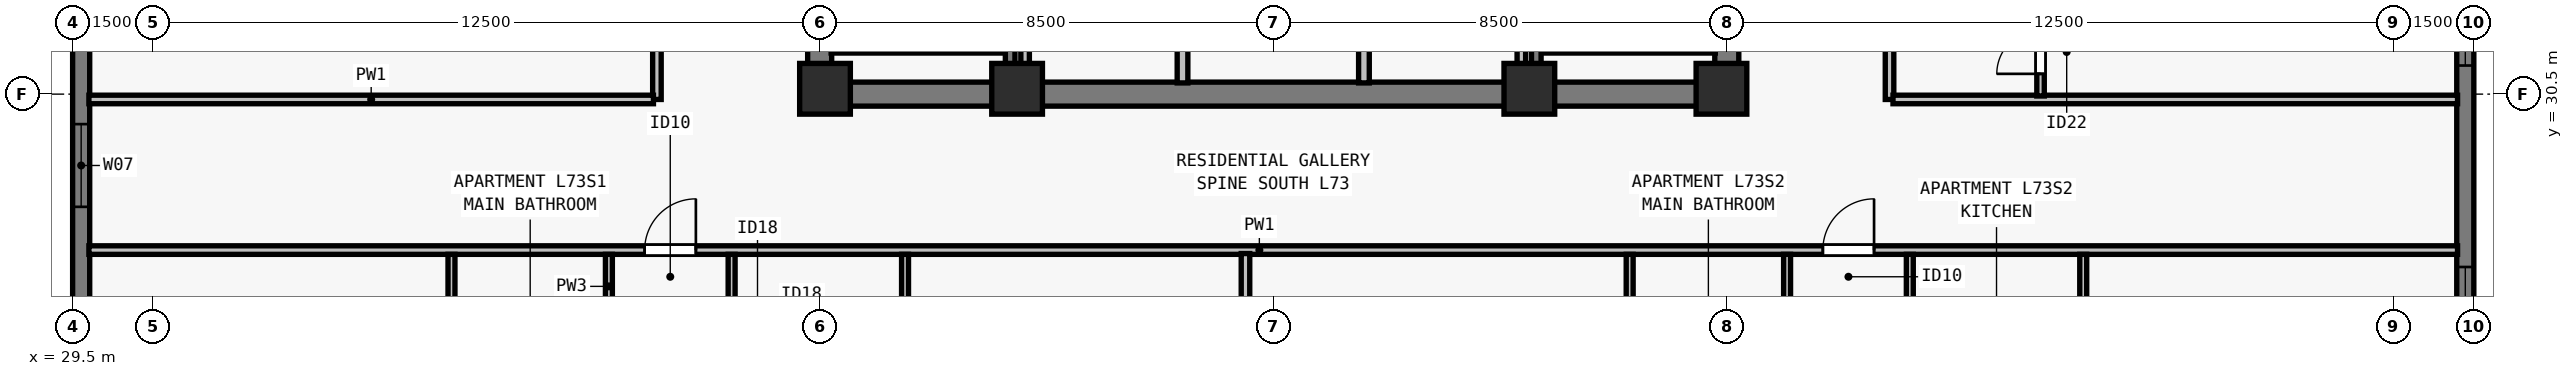
"""IFC4 building model, lengths in metres.
Left out: names, types, materials, properties, quantities, classifications, styles, units other than length and angle.
Written with IfcOpenShell. Run it as: python <this file> out.ifc"""

import sys

from ifc_helpers import new_model, si_unit, direction, frame, frame_2d, origin, origin_2d, place, context, subcontext, project, spatial, rectangle, extrude, element, fill, save


model = new_model("IFC4")
c1 = context("Model", 3, precision=1e-05, world=origin(), true_north=direction((0.0, 1.0)))
c2 = subcontext(c1, "Body", "Model", "MODEL_VIEW")
j1 = project(units=[si_unit("LENGTHUNIT", "METRE"), si_unit("PLANEANGLEUNIT", "RADIAN")], contexts=[c1])
p1 = place(None, origin())
s1 = spatial("IfcSite", under=j1, at=p1, CompositionType="ELEMENT")
p2 = place(p1, origin())
s2 = spatial("IfcBuilding", under=s1, at=p2, CompositionType="ELEMENT")
p3 = place(p2, frame((0.0, 0.0, 265.5)))
s3 = spatial("IfcBuildingStorey", under=s2, at=p3, CompositionType="ELEMENT", Elevation=265.5)
for number, where, z_axis, x_axis in (
    (1, (43.6, 30.6, 0.0), (0.0, 0.0, 1.0), (1.0, 0.0, 0.0)),
    (2, (47.2, 30.6, 0.0), (0.0, 0.0, 1.0), (1.0, 0.0, 0.0)),
    (3, (56.8, 30.6, 0.0), (0.0, 0.0, 1.0), (1.0, 0.0, 0.0)),
    (4, (60.4, 30.6, 0.0), (0.0, 0.0, 1.0), (1.0, 0.0, 0.0)),
):
    element("IfcColumn", number, at=place(p3, frame(where, z_axis=z_axis, x_axis=x_axis)), inside=s3, PredefinedType="COLUMN", context=c2, shape_type="SweptSolid", body=[
        extrude(rectangle(XDim=0.95, YDim=0.95, at=origin_2d()), origin(), (0.0, 0.0, 1.0), 3.5),
    ])
p4 = place(p3, frame((29.66, 21.5, 0.0), z_axis=(0.0, 0.0, 1.0), x_axis=(0.0, 1.0, 0.0)))
e5 = element("IfcWall", 5, at=p4, inside=s3, PredefinedType="SOLIDWALL", context=c2, shape_type="SweptSolid", body=[
    extrude(rectangle(XDim=34.702, YDim=0.32, at=frame_2d((17.351, 0.0))), origin(), (0.0, 0.0, 1.0), 3.29),
])
p5 = place(p4, frame((6.888, 0.0, 0.8)))
e6 = element("IfcOpeningElement", 6, at=p5, cuts=e5, PredefinedType="OPENING", context=c2, shape_type="SweptSolid", body=[
    extrude(rectangle(XDim=1.55, YDim=1.678, at=frame_2d((0.775, 0.839))), frame((0.0, 0.17, 0.0), z_axis=(0.0, -1.0, 0.0), x_axis=(1.0, 0.0, 0.0)), (0.0, 0.0, 1.0), 0.34),
])
p6 = place(p4, frame((10.113, 0.0, 0.8)))
e7 = element("IfcOpeningElement", 7, at=p6, cuts=e5, PredefinedType="OPENING", context=c2, shape_type="SweptSolid", body=[
    extrude(rectangle(XDim=1.85, YDim=1.678, at=frame_2d((0.925, 0.839))), frame((0.0, 0.17, 0.0), z_axis=(0.0, -1.0, 0.0), x_axis=(1.0, 0.0, 0.0)), (0.0, 0.0, 1.0), 0.34),
])
p7 = place(p4, frame((14.888, 0.0, 0.8)))
e8 = element("IfcOpeningElement", 8, at=p7, cuts=e5, PredefinedType="OPENING", context=c2, shape_type="SweptSolid", body=[
    extrude(rectangle(XDim=1.55, YDim=1.678, at=frame_2d((0.775, 0.839))), frame((0.0, 0.17, 0.0), z_axis=(0.0, -1.0, 0.0), x_axis=(1.0, 0.0, 0.0)), (0.0, 0.0, 1.0), 0.34),
])
p8 = place(p4, frame((18.114, 0.0, 0.8)))
e9 = element("IfcOpeningElement", 9, at=p8, cuts=e5, PredefinedType="OPENING", context=c2, shape_type="SweptSolid", body=[
    extrude(rectangle(XDim=1.85, YDim=1.678, at=frame_2d((0.925, 0.839))), frame((0.0, 0.17, 0.0), z_axis=(0.0, -1.0, 0.0), x_axis=(1.0, 0.0, 0.0)), (0.0, 0.0, 1.0), 0.34),
])
p9 = place(p4, frame((23.614, 0.0, 0.8)))
e10 = element("IfcOpeningElement", 10, at=p9, cuts=e5, PredefinedType="OPENING", context=c2, shape_type="SweptSolid", body=[
    extrude(rectangle(XDim=1.85, YDim=1.678, at=frame_2d((0.925, 0.839))), frame((0.0, 0.17, 0.0), z_axis=(0.0, -1.0, 0.0), x_axis=(1.0, 0.0, 0.0)), (0.0, 0.0, 1.0), 0.34),
])
p10 = place(p4, frame((29.24, 0.0, 0.8)))
e11 = element("IfcOpeningElement", 11, at=p10, cuts=e5, PredefinedType="OPENING", context=c2, shape_type="SweptSolid", body=[
    extrude(rectangle(XDim=1.55, YDim=1.678, at=frame_2d((0.775, 0.839))), frame((0.0, 0.17, 0.0), z_axis=(0.0, -1.0, 0.0), x_axis=(1.0, 0.0, 0.0)), (0.0, 0.0, 1.0), 0.34),
])
p11 = place(p3, frame((74.34, 56.5, 0.0), z_axis=(0.0, 0.0, 1.0), x_axis=(0.0, -1.0, 0.0)))
e12 = element("IfcWall", 12, at=p11, inside=s3, PredefinedType="SOLIDWALL", context=c2, shape_type="SweptSolid", body=[
    extrude(rectangle(XDim=34.702, YDim=0.32, at=frame_2d((17.351, 0.0))), origin(), (0.0, 0.0, 1.0), 3.29),
])
p12 = place(p11, frame((6.888, 0.0, 0.8)))
e13 = element("IfcOpeningElement", 13, at=p12, cuts=e12, PredefinedType="OPENING", context=c2, shape_type="SweptSolid", body=[
    extrude(rectangle(XDim=1.55, YDim=1.678, at=frame_2d((0.775, 0.839))), frame((0.0, 0.17, 0.0), z_axis=(0.0, -1.0, 0.0), x_axis=(1.0, 0.0, 0.0)), (0.0, 0.0, 1.0), 0.34),
])
p13 = place(p11, frame((10.113, 0.0, 0.8)))
e14 = element("IfcOpeningElement", 14, at=p13, cuts=e12, PredefinedType="OPENING", context=c2, shape_type="SweptSolid", body=[
    extrude(rectangle(XDim=1.85, YDim=1.678, at=frame_2d((0.925, 0.839))), frame((0.0, 0.17, 0.0), z_axis=(0.0, -1.0, 0.0), x_axis=(1.0, 0.0, 0.0)), (0.0, 0.0, 1.0), 0.34),
])
p14 = place(p11, frame((14.038, 0.0, 0.8)))
e15 = element("IfcOpeningElement", 15, at=p14, cuts=e12, PredefinedType="OPENING", context=c2, shape_type="SweptSolid", body=[
    extrude(rectangle(XDim=1.55, YDim=1.678, at=frame_2d((0.775, 0.839))), frame((0.0, 0.17, 0.0), z_axis=(0.0, -1.0, 0.0), x_axis=(1.0, 0.0, 0.0)), (0.0, 0.0, 1.0), 0.34),
])
p15 = place(p11, frame((18.114, 0.0, 0.8)))
e16 = element("IfcOpeningElement", 16, at=p15, cuts=e12, PredefinedType="OPENING", context=c2, shape_type="SweptSolid", body=[
    extrude(rectangle(XDim=1.85, YDim=1.678, at=frame_2d((0.925, 0.839))), frame((0.0, 0.17, 0.0), z_axis=(0.0, -1.0, 0.0), x_axis=(1.0, 0.0, 0.0)), (0.0, 0.0, 1.0), 0.34),
])
p16 = place(p11, frame((23.614, 0.0, 0.8)))
e17 = element("IfcOpeningElement", 17, at=p16, cuts=e12, PredefinedType="OPENING", context=c2, shape_type="SweptSolid", body=[
    extrude(rectangle(XDim=1.85, YDim=1.678, at=frame_2d((0.925, 0.839))), frame((0.0, 0.17, 0.0), z_axis=(0.0, -1.0, 0.0), x_axis=(1.0, 0.0, 0.0)), (0.0, 0.0, 1.0), 0.34),
])
p17 = place(p11, frame((29.24, 0.0, 0.8)))
e18 = element("IfcOpeningElement", 18, at=p17, cuts=e12, PredefinedType="OPENING", context=c2, shape_type="SweptSolid", body=[
    extrude(rectangle(XDim=1.55, YDim=1.678, at=frame_2d((0.775, 0.839))), frame((0.0, 0.17, 0.0), z_axis=(0.0, -1.0, 0.0), x_axis=(1.0, 0.0, 0.0)), (0.0, 0.0, 1.0), 0.34),
])
p18 = place(p3, frame((43.275, 30.5, 0.0), z_axis=(0.0, 0.0, 1.0), x_axis=(1.0, 0.0, 0.0)))
e19 = element("IfcWall", 19, at=p18, inside=s3, PredefinedType="SHEAR", context=c2, shape_type="SweptSolid", body=[
    extrude(rectangle(XDim=17.45, YDim=0.45, at=frame_2d((8.725, 0.0))), origin(), (0.0, 0.0, 1.0), 3.29),
])
for number, where, z_axis, x_axis in (
    (20, (43.5, 30.715, 0.0), (0.0, 0.0, 1.0), (0.0, 1.0, 0.0)),
    (21, (60.5, 30.715, 0.0), (0.0, 0.0, 1.0), (0.0, 1.0, 0.0)),
):
    element("IfcWall", number, at=place(p3, frame(where, z_axis=z_axis, x_axis=x_axis)), inside=s3, PredefinedType="SHEAR", context=c2, shape_type="SweptSolid", body=[
        extrude(rectangle(XDim=8.035, YDim=0.45, at=frame_2d((4.018, 0.0))), origin(), (0.0, 0.0, 1.0), 3.29),
    ])
p19 = place(p3, frame((50.3, 30.71, 0.0), z_axis=(0.0, 0.0, 1.0), x_axis=(0.0, 1.0, 0.0)))
e22 = element("IfcWall", 22, at=p19, inside=s3, PredefinedType="SOLIDWALL", context=c2, shape_type="SweptSolid", body=[
    extrude(rectangle(XDim=7.905, YDim=0.2, at=frame_2d((3.953, 0.0))), origin(), (0.0, 0.0, 1.0), 3.29),
])
p20 = place(p19, frame((3.34, 0.0, 0.0)))
e23 = element("IfcOpeningElement", 23, at=p20, cuts=e22, PredefinedType="OPENING", context=c2, shape_type="SweptSolid", body=[
    extrude(rectangle(XDim=0.9, YDim=2.12, at=frame_2d((0.45, 1.06))), frame((0.0, 0.11, 0.0), z_axis=(0.0, -1.0, 0.0), x_axis=(1.0, 0.0, 0.0)), (0.0, 0.0, 1.0), 0.22),
])
p21 = place(p3, frame((53.7, 30.71, 0.0), z_axis=(0.0, 0.0, 1.0), x_axis=(0.0, 1.0, 0.0)))
e24 = element("IfcWall", 24, at=p21, inside=s3, PredefinedType="SOLIDWALL", context=c2, shape_type="SweptSolid", body=[
    extrude(rectangle(XDim=7.905, YDim=0.2, at=frame_2d((3.953, 0.0))), origin(), (0.0, 0.0, 1.0), 3.29),
])
p22 = place(p21, frame((3.14, 0.0, 0.0)))
e25 = element("IfcOpeningElement", 25, at=p22, cuts=e24, PredefinedType="OPENING", context=c2, shape_type="SweptSolid", body=[
    extrude(rectangle(XDim=0.9, YDim=2.12, at=frame_2d((0.45, 1.06))), frame((0.0, 0.11, 0.0), z_axis=(0.0, -1.0, 0.0), x_axis=(1.0, 0.0, 0.0)), (0.0, 0.0, 1.0), 0.22),
])
for number, where, z_axis, x_axis in (
    (26, (47.35, 30.71, 0.0), (0.0, 0.0, 1.0), (0.0, 1.0, 0.0)),
    (27, (56.65, 30.71, 0.0), (0.0, 0.0, 1.0), (0.0, 1.0, 0.0)),
):
    element("IfcWall", number, at=place(p3, frame(where, z_axis=z_axis, x_axis=x_axis)), inside=s3, PredefinedType="PARTITIONING", context=c2, shape_type="SweptSolid", body=[
        extrude(rectangle(XDim=7.905, YDim=0.16, at=frame_2d((3.953, 0.0))), origin(), (0.0, 0.0, 1.0), 3.29),
    ])
p23 = place(p3, frame((29.805, 27.577, 0.0), z_axis=(0.0, 0.0, 1.0), x_axis=(1.0, 0.0, 0.0)))
e28 = element("IfcWall", 28, at=p23, inside=s3, PredefinedType="PARTITIONING", context=c2, shape_type="SweptSolid", body=[
    extrude(rectangle(XDim=44.39, YDim=0.16, at=frame_2d((22.195, 0.0))), origin(), (0.0, 0.0, 1.0), 2.958),
])
p24 = place(p23, frame((10.415, 0.0, 0.0)))
e29 = element("IfcOpeningElement", 29, at=p24, cuts=e28, PredefinedType="OPENING", context=c2, shape_type="SweptSolid", body=[
    extrude(rectangle(XDim=0.96, YDim=2.18, at=frame_2d((0.48, 1.09))), frame((0.0, 0.09, 0.0), z_axis=(0.0, -1.0, 0.0), x_axis=(1.0, 0.0, 0.0)), (0.0, 0.0, 1.0), 0.18),
])
p25 = place(p23, frame((32.495, 0.0, 0.0)))
e30 = element("IfcOpeningElement", 30, at=p25, cuts=e28, PredefinedType="OPENING", context=c2, shape_type="SweptSolid", body=[
    extrude(rectangle(XDim=0.96, YDim=2.18, at=frame_2d((0.48, 1.09))), frame((0.0, 0.09, 0.0), z_axis=(0.0, -1.0, 0.0), x_axis=(1.0, 0.0, 0.0)), (0.0, 0.0, 1.0), 0.18),
])
p26 = place(p3, frame((40.45, 30.4, 0.0), z_axis=(0.0, 0.0, 1.0), x_axis=(0.0, 1.0, 0.0)))
e31 = element("IfcWall", 31, at=p26, inside=s3, PredefinedType="PARTITIONING", context=c2, shape_type="SweptSolid", body=[
    extrude(rectangle(XDim=17.2, YDim=0.16, at=frame_2d((8.6, 0.0))), origin(), (0.0, 0.0, 1.0), 3.29),
])
p27 = place(p26, frame((3.6, 0.0, 0.0)))
e32 = element("IfcOpeningElement", 32, at=p27, cuts=e31, PredefinedType="OPENING", context=c2, shape_type="SweptSolid", body=[
    extrude(rectangle(XDim=0.96, YDim=2.12, at=frame_2d((0.48, 1.06))), frame((0.0, 0.09, 0.0), z_axis=(0.0, -1.0, 0.0), x_axis=(1.0, 0.0, 0.0)), (0.0, 0.0, 1.0), 0.18),
])
p28 = place(p26, frame((12.44, 0.0, 0.0)))
e33 = element("IfcOpeningElement", 33, at=p28, cuts=e31, PredefinedType="OPENING", context=c2, shape_type="SweptSolid", body=[
    extrude(rectangle(XDim=0.96, YDim=2.18, at=frame_2d((0.48, 1.09))), frame((0.0, 0.09, 0.0), z_axis=(0.0, -1.0, 0.0), x_axis=(1.0, 0.0, 0.0)), (0.0, 0.0, 1.0), 0.18),
])
p29 = place(p3, frame((63.55, 30.4, 0.0), z_axis=(0.0, 0.0, 1.0), x_axis=(0.0, 1.0, 0.0)))
e34 = element("IfcWall", 34, at=p29, inside=s3, PredefinedType="PARTITIONING", context=c2, shape_type="SweptSolid", body=[
    extrude(rectangle(XDim=17.2, YDim=0.16, at=frame_2d((8.6, 0.0))), origin(), (0.0, 0.0, 1.0), 3.29),
])
p30 = place(p29, frame((8.12, 0.0, 0.0)))
e35 = element("IfcOpeningElement", 35, at=p30, cuts=e34, PredefinedType="OPENING", context=c2, shape_type="SweptSolid", body=[
    extrude(rectangle(XDim=0.96, YDim=2.18, at=frame_2d((0.48, 1.09))), frame((0.0, 0.09, 0.0), z_axis=(0.0, -1.0, 0.0), x_axis=(1.0, 0.0, 0.0)), (0.0, 0.0, 1.0), 0.18),
])
for number, where, z_axis, x_axis in (
    (36, (29.805, 30.4, 0.0), (0.0, 0.0, 1.0), (1.0, 0.0, 0.0)),
    (37, (63.615, 30.4, 0.0), (0.0, 0.0, 1.0), (1.0, 0.0, 0.0)),
):
    element("IfcWall", number, at=place(p3, frame(where, z_axis=z_axis, x_axis=x_axis)), inside=s3, PredefinedType="PARTITIONING", context=c2, shape_type="SweptSolid", body=[
        extrude(rectangle(XDim=10.58, YDim=0.16, at=frame_2d((5.29, 0.0))), origin(), (0.0, 0.0, 1.0), 3.29),
    ])
p31 = place(p3, frame((36.6, 24.748, 0.0), z_axis=(0.0, 0.0, 1.0), x_axis=(0.0, 1.0, 0.0)))
e38 = element("IfcWall", 38, at=p31, inside=s3, PredefinedType="PLUMBINGWALL", context=c2, shape_type="SweptSolid", body=[
    extrude(rectangle(XDim=2.75, YDim=0.13, at=frame_2d((1.375, 0.0))), origin(), (0.0, 0.0, 1.0), 3.29),
])
p32 = place(p3, frame((39.55, 24.748, 0.0), z_axis=(0.0, 0.0, 1.0), x_axis=(0.0, 1.0, 0.0)))
e39 = element("IfcWall", 39, at=p32, inside=s3, PredefinedType="PLUMBINGWALL", context=c2, shape_type="SweptSolid", body=[
    extrude(rectangle(XDim=2.75, YDim=0.13, at=frame_2d((1.375, 0.0))), origin(), (0.0, 0.0, 1.0), 3.29),
])
p33 = place(p32, frame((0.55, 0.0, 0.0)))
e40 = element("IfcOpeningElement", 40, at=p33, cuts=e39, PredefinedType="OPENING", context=c2, shape_type="SweptSolid", body=[
    extrude(rectangle(XDim=0.85, YDim=2.08, at=frame_2d((0.425, 1.04))), frame((0.0, 0.075, 0.0), z_axis=(0.0, -1.0, 0.0), x_axis=(1.0, 0.0, 0.0)), (0.0, 0.0, 1.0), 0.15),
])
p34 = place(p3, frame((45.1, 24.748, 0.0), z_axis=(0.0, 0.0, 1.0), x_axis=(0.0, 1.0, 0.0)))
e41 = element("IfcWall", 41, at=p34, inside=s3, PredefinedType="PLUMBINGWALL", context=c2, shape_type="SweptSolid", body=[
    extrude(rectangle(XDim=2.75, YDim=0.13, at=frame_2d((1.375, 0.0))), origin(), (0.0, 0.0, 1.0), 3.29),
])
p35 = place(p3, frame((41.85, 24.748, 0.0), z_axis=(0.0, 0.0, 1.0), x_axis=(0.0, 1.0, 0.0)))
e42 = element("IfcWall", 42, at=p35, inside=s3, PredefinedType="PLUMBINGWALL", context=c2, shape_type="SweptSolid", body=[
    extrude(rectangle(XDim=2.75, YDim=0.13, at=frame_2d((1.375, 0.0))), origin(), (0.0, 0.0, 1.0), 3.29),
])
p36 = place(p35, frame((0.55, 0.0, 0.0)))
e43 = element("IfcOpeningElement", 43, at=p36, cuts=e42, PredefinedType="OPENING", context=c2, shape_type="SweptSolid", body=[
    extrude(rectangle(XDim=0.88, YDim=2.1, at=frame_2d((0.44, 1.05))), frame((0.0, 0.075, 0.0), z_axis=(0.0, -1.0, 0.0), x_axis=(1.0, 0.0, 0.0)), (0.0, 0.0, 1.0), 0.15),
])
p37 = place(p3, frame((51.48, 16.805, 0.0), z_axis=(0.0, 0.0, 1.0), x_axis=(0.0, 1.0, 0.0)))
e44 = element("IfcWall", 44, at=p37, inside=s3, PredefinedType="PARTITIONING", context=c2, shape_type="SweptSolid", body=[
    extrude(rectangle(XDim=10.708, YDim=0.16, at=frame_2d((5.354, 0.0))), origin(), (0.0, 0.0, 1.0), 2.958),
])
p38 = place(p3, frame((58.68, 24.748, 0.0), z_axis=(0.0, 0.0, 1.0), x_axis=(0.0, 1.0, 0.0)))
e45 = element("IfcWall", 45, at=p38, inside=s3, PredefinedType="PLUMBINGWALL", context=c2, shape_type="SweptSolid", body=[
    extrude(rectangle(XDim=2.75, YDim=0.13, at=frame_2d((1.375, 0.0))), origin(), (0.0, 0.0, 1.0), 3.29),
])
p39 = place(p3, frame((61.63, 24.748, 0.0), z_axis=(0.0, 0.0, 1.0), x_axis=(0.0, 1.0, 0.0)))
e46 = element("IfcWall", 46, at=p39, inside=s3, PredefinedType="PLUMBINGWALL", context=c2, shape_type="SweptSolid", body=[
    extrude(rectangle(XDim=2.75, YDim=0.13, at=frame_2d((1.375, 0.0))), origin(), (0.0, 0.0, 1.0), 3.29),
])
p40 = place(p39, frame((0.55, 0.0, 0.0)))
e47 = element("IfcOpeningElement", 47, at=p40, cuts=e46, PredefinedType="OPENING", context=c2, shape_type="SweptSolid", body=[
    extrude(rectangle(XDim=0.85, YDim=2.08, at=frame_2d((0.425, 1.04))), frame((0.0, 0.075, 0.0), z_axis=(0.0, -1.0, 0.0), x_axis=(1.0, 0.0, 0.0)), (0.0, 0.0, 1.0), 0.15),
])
p41 = place(p3, frame((67.18, 24.748, 0.0), z_axis=(0.0, 0.0, 1.0), x_axis=(0.0, 1.0, 0.0)))
e48 = element("IfcWall", 48, at=p41, inside=s3, PredefinedType="PLUMBINGWALL", context=c2, shape_type="SweptSolid", body=[
    extrude(rectangle(XDim=2.75, YDim=0.13, at=frame_2d((1.375, 0.0))), origin(), (0.0, 0.0, 1.0), 3.29),
])
p42 = place(p3, frame((63.93, 24.748, 0.0), z_axis=(0.0, 0.0, 1.0), x_axis=(0.0, 1.0, 0.0)))
e49 = element("IfcWall", 49, at=p42, inside=s3, PredefinedType="PLUMBINGWALL", context=c2, shape_type="SweptSolid", body=[
    extrude(rectangle(XDim=2.75, YDim=0.13, at=frame_2d((1.375, 0.0))), origin(), (0.0, 0.0, 1.0), 2.573),
])
p43 = place(p42, frame((0.55, 0.0, 0.0)))
e50 = element("IfcOpeningElement", 50, at=p43, cuts=e49, PredefinedType="OPENING", context=c2, shape_type="SweptSolid", body=[
    extrude(rectangle(XDim=0.88, YDim=2.1, at=frame_2d((0.44, 1.05))), frame((0.0, 0.075, 0.0), z_axis=(0.0, -1.0, 0.0), x_axis=(1.0, 0.0, 0.0)), (0.0, 0.0, 1.0), 0.15),
])
p44 = place(p3, frame((66.38, 30.465, 0.0), z_axis=(0.0, 0.0, 1.0), x_axis=(0.0, 1.0, 0.0)))
e51 = element("IfcWall", 51, at=p44, inside=s3, PredefinedType="PARTITIONING", context=c2, shape_type="SweptSolid", body=[
    extrude(rectangle(XDim=4.16, YDim=0.14, at=frame_2d((2.08, 0.0))), origin(), (0.0, 0.0, 1.0), 3.29),
])
p45 = place(p44, frame((0.415, 0.0, 0.0)))
e52 = element("IfcOpeningElement", 52, at=p45, cuts=e51, PredefinedType="OPENING", context=c2, shape_type="SweptSolid", body=[
    extrude(rectangle(XDim=0.82, YDim=2.1, at=frame_2d((0.41, 1.05))), frame((0.0, 0.08, 0.0), z_axis=(0.0, -1.0, 0.0), x_axis=(1.0, 0.0, 0.0)), (0.0, 0.0, 1.0), 0.16),
])
p46 = place(p3, frame((43.715, 31.36, 0.0), z_axis=(0.0, 0.0, 1.0), x_axis=(1.0, 0.0, 0.0)))
e53 = element("IfcWall", 53, at=p46, inside=s3, PredefinedType="SOLIDWALL", context=c2, shape_type="SweptSolid", body=[
    extrude(rectangle(XDim=3.28, YDim=0.18, at=frame_2d((1.64, 0.0))), origin(), (0.0, 0.0, 1.0), 3.29),
])
p47 = place(p3, frame((47.07, 38.78, 0.0), z_axis=(0.0, 0.0, 1.0), x_axis=(0.0, -1.0, 0.0)))
e54 = element("IfcWall", 54, at=p47, inside=s3, PredefinedType="SOLIDWALL", context=c2, shape_type="SweptSolid", body=[
    extrude(rectangle(XDim=8.067, YDim=0.18, at=frame_2d((4.034, 0.0))), origin(), (0.0, 0.0, 1.0), 3.29),
])
p48 = place(p3, frame((57.005, 31.36, 0.0), z_axis=(0.0, 0.0, 1.0), x_axis=(1.0, 0.0, 0.0)))
e55 = element("IfcWall", 55, at=p48, inside=s3, PredefinedType="SOLIDWALL", context=c2, shape_type="SweptSolid", body=[
    extrude(rectangle(XDim=3.28, YDim=0.18, at=frame_2d((1.64, 0.0))), origin(), (0.0, 0.0, 1.0), 3.29),
])
p49 = place(p3, frame((56.93, 38.78, 0.0), z_axis=(0.0, 0.0, 1.0), x_axis=(0.0, -1.0, 0.0)))
e56 = element("IfcWall", 56, at=p49, inside=s3, PredefinedType="SOLIDWALL", context=c2, shape_type="SweptSolid", body=[
    extrude(rectangle(XDim=8.067, YDim=0.18, at=frame_2d((4.034, 0.0))), origin(), (0.0, 0.0, 1.0), 3.29),
])
p50 = place(p5, origin())
e57 = element("IfcWindow", 57, at=p50, inside=s3, PartitioningType="SINGLE_PANEL", PredefinedType="WINDOW", context=c2, shape_type="SweptSolid", body=[
    extrude(rectangle(XDim=1.55, YDim=1.678, at=frame_2d((0.775, 0.839))), frame((0.0, -0.05, 0.0), z_axis=(0.0, -1.0, 0.0), x_axis=(1.0, 0.0, 0.0)), (0.0, 0.0, 1.0), 0.06),
])
fill(e6, e57)
p51 = place(p16, origin())
e58 = element("IfcWindow", 58, at=p51, inside=s3, PartitioningType="SINGLE_PANEL", PredefinedType="WINDOW", context=c2, shape_type="SweptSolid", body=[
    extrude(rectangle(XDim=1.85, YDim=1.678, at=frame_2d((0.925, 0.839))), frame((0.0, -0.05, 0.0), z_axis=(0.0, -1.0, 0.0), x_axis=(1.0, 0.0, 0.0)), (0.0, 0.0, 1.0), 0.06),
])
fill(e17, e58)
p52 = place(p17, origin())
e59 = element("IfcWindow", 59, at=p52, inside=s3, PartitioningType="SINGLE_PANEL", PredefinedType="WINDOW", context=c2, shape_type="SweptSolid", body=[
    extrude(rectangle(XDim=1.55, YDim=1.678, at=frame_2d((0.775, 0.839))), frame((0.0, -0.05, 0.0), z_axis=(0.0, -1.0, 0.0), x_axis=(1.0, 0.0, 0.0)), (0.0, 0.0, 1.0), 0.06),
])
fill(e18, e59)
p53 = place(p24, origin())
e60 = element("IfcDoor", 60, at=p53, inside=s3, OperationType="SINGLE_SWING_RIGHT", PredefinedType="DOOR", context=c2, shape_type="SweptSolid", body=[
    extrude(rectangle(XDim=0.96, YDim=2.18, at=frame_2d((0.48, 1.09))), frame((0.0, 0.025, 0.0), z_axis=(0.0, -1.0, 0.0), x_axis=(1.0, 0.0, 0.0)), (0.0, 0.0, 1.0), 0.05),
])
fill(e29, e60)
p54 = place(p25, origin())
e61 = element("IfcDoor", 61, at=p54, inside=s3, OperationType="SINGLE_SWING_RIGHT", PredefinedType="DOOR", context=c2, shape_type="SweptSolid", body=[
    extrude(rectangle(XDim=0.96, YDim=2.18, at=frame_2d((0.48, 1.09))), frame((0.0, 0.025, 0.0), z_axis=(0.0, -1.0, 0.0), x_axis=(1.0, 0.0, 0.0)), (0.0, 0.0, 1.0), 0.05),
])
fill(e30, e61)
p55 = place(p45, origin())
e62 = element("IfcDoor", 62, at=p55, inside=s3, OperationType="SINGLE_SWING_LEFT", PredefinedType="DOOR", context=c2, shape_type="SweptSolid", body=[
    extrude(rectangle(XDim=0.82, YDim=2.1, at=frame_2d((0.41, 1.05))), frame((0.0, 0.025, 0.0), z_axis=(0.0, -1.0, 0.0), x_axis=(1.0, 0.0, 0.0)), (0.0, 0.0, 1.0), 0.05),
])
fill(e52, e62)
save(model, sys.argv[1])
